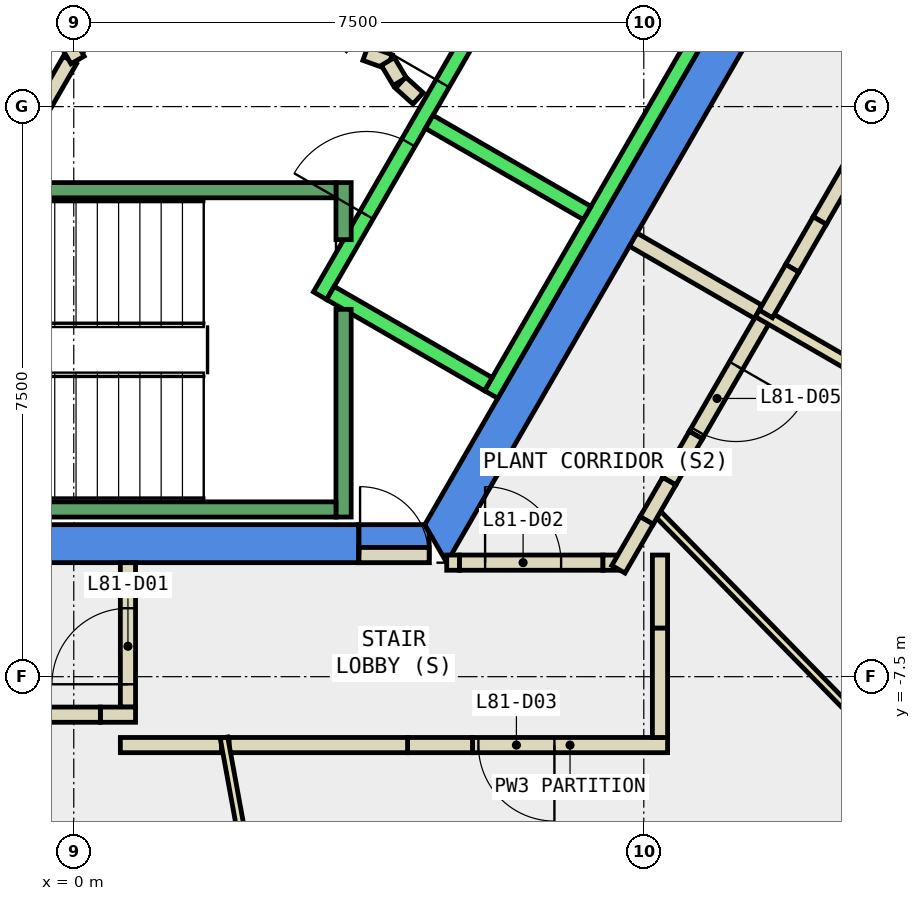
"""IFC4 building model, lengths in metres.
Left out: names, types, materials, properties, quantities, classifications, styles, units other than length and angle.
Written with IfcOpenShell. Run it as: python <this file> out.ifc"""

import sys

from ifc_helpers import new_model, si_unit, direction, frame, frame_2d, origin, place, context, subcontext, project, spatial, polyline, rectangle, outline, extrude, element, fill, save


model = new_model("IFC4")
c1 = context("Model", 3, precision=1e-05, world=origin(), true_north=direction((0.0, 1.0)))
c2 = subcontext(c1, "Body", "Model", "MODEL_VIEW")
j1 = project(units=[si_unit("LENGTHUNIT", "METRE"), si_unit("PLANEANGLEUNIT", "RADIAN")], contexts=[c1])
p1 = place(None, origin())
s1 = spatial("IfcSite", under=j1, at=p1, CompositionType="ELEMENT")
p2 = place(p1, origin())
s2 = spatial("IfcBuilding", under=s1, at=p2, CompositionType="ELEMENT")
p3 = place(p2, frame((0.0, 0.0, 344.9)))
s3 = spatial("IfcBuildingStorey", under=s2, at=p3, CompositionType="ELEMENT", Elevation=344.9)
p4 = place(p3, frame((0.0, 0.0, -0.35)))
e1 = element("IfcWall", 1, at=p4, inside=s3, PredefinedType="SHEAR", context=c2, shape_type="SweptSolid", body=[
    extrude(outline(polyline([(3.75, -6.0), (3.75, -5.5), (-4.619, -5.5), (-4.907, -6.0), (3.75, -6.0)])), origin(), (0.0, 0.0, 1.0), 4.4),
])
p5 = place(p3, frame((0.0, 0.0, 3.6)))
e2 = element("IfcWall", 2, at=p5, inside=s3, PredefinedType="SHEAR", context=c2, shape_type="SweptSolid", body=[
    extrude(outline(polyline([(4.676, -6.0), (4.676, -5.6), (4.619, -5.5), (3.75, -5.5), (3.75, -6.0), (4.676, -6.0)])), origin(), (0.0, 0.0, 1.0), 0.45),
])
p6 = place(p3, frame((0.0, 0.0, -0.35)))
e3 = element("IfcWall", 3, at=p6, inside=s3, PredefinedType="SHEAR", context=c2, shape_type="SweptSolid", body=[
    extrude(outline(polyline([(4.907, -6.0), (9.815, 2.5), (9.238, 2.5), (4.619, -5.5), (4.907, -6.0)])), origin(), (0.0, 0.0, 1.0), 4.4),
])
p7 = place(p3, frame((-0.982, -1.0, 0.0), z_axis=(0.0, 0.0, 1.0), x_axis=(0.50024047865, 0.865886518847, 0.0)))
e4 = element("IfcWall", 4, at=p7, inside=s3, PredefinedType="PARTITIONING", context=c2, shape_type="SweptSolid", body=[
    extrude(rectangle(XDim=1.863, YDim=0.2, at=frame_2d((0.931, 0.0))), origin(), (0.0, 0.0, 1.0), 4.05),
])
p8 = place(p3, frame((3.838, 0.702, 0.0), z_axis=(0.0, 0.0, 1.0), x_axis=(0.941035081519, -0.338308993895, 0.0)))
e5 = element("IfcWall", 5, at=p8, inside=s3, PredefinedType="PARTITIONING", context=c2, shape_type="SweptSolid", body=[
    extrude(rectangle(XDim=0.337, YDim=0.2, at=frame_2d((0.168, 0.0))), origin(), (0.0, 0.0, 1.0), 4.05),
])
p9 = place(p3, frame((4.132, 0.593, 0.0), z_axis=(0.0, 0.0, 1.0), x_axis=(0.513561617048, -0.858052717201, 0.0)))
e6 = element("IfcWall", 6, at=p9, inside=s3, PredefinedType="PARTITIONING", context=c2, shape_type="SweptSolid", body=[
    extrude(rectangle(XDim=0.308, YDim=0.2, at=frame_2d((0.154, 0.0))), origin(), (0.0, 0.0, 1.0), 4.05),
])
p10 = place(p3, frame((4.301, 0.315, 0.0), z_axis=(0.0, 0.0, 1.0), x_axis=(0.741798017506, -0.670623367639, 0.0)))
e7 = element("IfcWall", 7, at=p10, inside=s3, PredefinedType="PARTITIONING", context=c2, shape_type="SweptSolid", body=[
    extrude(rectangle(XDim=0.309, YDim=0.2, at=frame_2d((0.154, 0.0))), origin(), (0.0, 0.0, 1.0), 4.05),
])
p11 = place(p3, frame((-2.54, 5.1, 0.0), z_axis=(0.0, 0.0, 1.0), x_axis=(0.499925051871, -0.866068670783, 0.0)))
e8 = element("IfcWall", 8, at=p11, inside=s3, PredefinedType="PARTITIONING", context=c2, shape_type="SweptSolid", body=[
    extrude(rectangle(XDim=5.181, YDim=0.2, at=frame_2d((2.59, 0.0))), origin(), (0.0, 0.0, 1.0), 4.05),
])
p12 = place(p11, frame((2.04, 0.0, 0.0)))
e9 = element("IfcOpeningElement", 9, at=p12, cuts=e8, PredefinedType="OPENING", context=c2, shape_type="SweptSolid", body=[
    extrude(rectangle(XDim=1.0, YDim=2.1, at=frame_2d((0.5, 1.05))), frame((0.0, 0.11, 0.0), z_axis=(0.0, -1.0, 0.0), x_axis=(1.0, 0.0, 0.0)), (0.0, 0.0, 1.0), 0.22),
])
p13 = place(p3, frame((0.713, -7.9, 0.0), z_axis=(0.0, 0.0, 1.0), x_axis=(0.0, 1.0, 0.0)))
e10 = element("IfcWall", 10, at=p13, inside=s3, PredefinedType="PARTITIONING", context=c2, shape_type="SweptSolid", body=[
    extrude(rectangle(XDim=1.9, YDim=0.2, at=frame_2d((0.95, 0.0))), origin(), (0.0, 0.0, 1.0), 4.05),
])
p14 = place(p13, frame((0.3, 0.0, 0.0)))
e11 = element("IfcOpeningElement", 11, at=p14, cuts=e10, PredefinedType="OPENING", context=c2, shape_type="SweptSolid", body=[
    extrude(rectangle(XDim=1.0, YDim=2.1, at=frame_2d((0.5, 1.05))), frame((0.0, 0.11, 0.0), z_axis=(0.0, -1.0, 0.0), x_axis=(1.0, 0.0, 0.0)), (0.0, 0.0, 1.0), 0.22),
])
p15 = place(p3, frame((4.907, -6.0, 0.0), z_axis=(0.0, 0.0, 1.0), x_axis=(1.0, 0.0, 0.0)))
e12 = element("IfcWall", 12, at=p15, inside=s3, PredefinedType="PARTITIONING", context=c2, shape_type="SweptSolid", body=[
    extrude(rectangle(XDim=0.169, YDim=0.2, at=frame_2d((0.084, 0.0))), origin(), (0.0, 0.0, 1.0), 2.4),
])
p16 = place(p3, frame((7.813, -8.4, 0.0), z_axis=(0.0, 0.0, 1.0), x_axis=(-1.0, 0.0, 0.0)))
e13 = element("IfcWall", 13, at=p16, inside=s3, PredefinedType="PARTITIONING", context=c2, shape_type="SweptSolid", body=[
    extrude(rectangle(XDim=2.567, YDim=0.2, at=frame_2d((1.283, 0.0))), origin(), (0.0, 0.0, 1.0), 4.05),
])
p17 = place(p16, frame((1.489, 0.0, 0.0)))
e14 = element("IfcOpeningElement", 14, at=p17, cuts=e13, PredefinedType="OPENING", context=c2, shape_type="SweptSolid", body=[
    extrude(rectangle(XDim=1.0, YDim=2.1, at=frame_2d((0.5, 1.05))), frame((0.0, 0.11, 0.0), z_axis=(0.0, -1.0, 0.0), x_axis=(1.0, 0.0, 0.0)), (0.0, 0.0, 1.0), 0.22),
])
p18 = place(p3, frame((7.713, -5.9, 0.0), z_axis=(0.0, 0.0, 1.0), x_axis=(0.0, -1.0, 0.0)))
e15 = element("IfcWall", 15, at=p18, inside=s3, PredefinedType="PARTITIONING", context=c2, shape_type="SweptSolid", body=[
    extrude(rectangle(XDim=0.962, YDim=0.2, at=frame_2d((0.481, 0.0))), origin(), (0.0, 0.0, 1.0), 1.95),
])
p19 = place(p3, frame((1.944, -8.4, 0.0), z_axis=(0.0, 0.0, 1.0), x_axis=(-1.0, 0.0, 0.0)))
e16 = element("IfcWall", 16, at=p19, inside=s3, PredefinedType="PARTITIONING", context=c2, shape_type="SweptSolid", body=[
    extrude(rectangle(XDim=1.331, YDim=0.2, at=frame_2d((0.666, 0.0))), origin(), (0.0, 0.0, 1.0), 4.05),
])
p20 = place(p3, frame((0.813, -8.0, 0.0), z_axis=(0.0, 0.0, 1.0), x_axis=(-1.0, 0.0, 0.0)))
e17 = element("IfcWall", 17, at=p20, inside=s3, PredefinedType="PARTITIONING", context=c2, shape_type="SweptSolid", body=[
    extrude(rectangle(XDim=0.463, YDim=0.2, at=frame_2d((0.231, 0.0))), origin(), (0.0, 0.0, 1.0), 4.05),
])
p21 = place(p3, frame((9.106, -2.728, 0.0), z_axis=(0.0, 0.0, 1.0), x_axis=(-0.500246664097, -0.865882945357, 0.0)))
e18 = element("IfcWall", 18, at=p21, inside=s3, PredefinedType="PARTITIONING", context=c2, shape_type="SweptSolid", body=[
    extrude(rectangle(XDim=1.841, YDim=0.2, at=frame_2d((0.92, 0.0))), origin(), (0.0, 0.0, 1.0), 4.05),
])
p22 = place(p21, frame((0.784, 0.0, 0.0)))
e19 = element("IfcOpeningElement", 19, at=p22, cuts=e18, PredefinedType="OPENING", context=c2, shape_type="SweptSolid", body=[
    extrude(rectangle(XDim=1.0, YDim=2.1, at=frame_2d((0.5, 1.05))), frame((0.0, 0.11, 0.0), z_axis=(0.0, -1.0, 0.0), x_axis=(1.0, 0.0, 0.0)), (0.0, 0.0, 1.0), 0.22),
])
p23 = place(p3, frame((7.361, -1.75, 0.0), z_axis=(0.0, 0.0, 1.0), x_axis=(0.865980106173, -0.500078449558, 0.0)))
e20 = element("IfcWall", 20, at=p23, inside=s3, PredefinedType="PARTITIONING", context=c2, shape_type="SweptSolid", body=[
    extrude(rectangle(XDim=1.9, YDim=0.2, at=frame_2d((0.95, 0.0))), origin(), (0.0, 0.0, 1.0), 4.05),
])
p24 = place(p3, frame((7.624, -5.295, 0.0), z_axis=(0.0, 0.0, 1.0), x_axis=(0.699214658751, -0.714911785458, 0.0)))
e21 = element("IfcWall", 21, at=p24, inside=s3, PredefinedType="PARTITIONING", context=c2, shape_type="SweptSolid", body=[
    extrude(rectangle(XDim=10.576, YDim=0.1, at=frame_2d((5.288, 0.0))), origin(), (0.0, 0.0, 1.0), 4.05),
])
p25 = place(p3, frame((3.75, -5.9, 0.0), z_axis=(0.0, 0.0, 1.0), x_axis=(1.0, 0.0, 0.0)))
e22 = element("IfcWall", 22, at=p25, inside=s3, PredefinedType="PARTITIONING", context=c2, shape_type="SweptSolid", body=[
    extrude(rectangle(XDim=0.926, YDim=0.2, at=frame_2d((0.463, 0.0))), origin(), (0.0, 0.0, 1.0), 2.4),
])
p26 = place(p25, frame((0.017, 0.0, 0.0)))
e23 = element("IfcOpeningElement", 23, at=p26, cuts=e22, PredefinedType="OPENING", context=c2, shape_type="SweptSolid", body=[
    extrude(rectangle(XDim=0.9, YDim=2.1, at=frame_2d((0.45, 1.05))), frame((0.0, 0.11, 0.0), z_axis=(0.0, -1.0, 0.0), x_axis=(1.0, 0.0, 0.0)), (0.0, 0.0, 1.0), 0.22),
])
p27 = place(p3, frame((5.076, -6.0, 0.0), z_axis=(0.0, 0.0, 1.0), x_axis=(1.0, 0.0, 0.0)))
e24 = element("IfcWall", 24, at=p27, inside=s3, PredefinedType="PARTITIONING", context=c2, shape_type="SweptSolid", body=[
    extrude(rectangle(XDim=1.887, YDim=0.2, at=frame_2d((0.943, 0.0))), origin(), (0.0, 0.0, 1.0), 4.05),
])
p28 = place(p27, frame((0.336, 0.0, 0.0)))
e25 = element("IfcOpeningElement", 25, at=p28, cuts=e24, PredefinedType="OPENING", context=c2, shape_type="SweptSolid", body=[
    extrude(rectangle(XDim=1.0, YDim=2.1, at=frame_2d((0.5, 1.05))), frame((0.0, 0.11, 0.0), z_axis=(0.0, -1.0, 0.0), x_axis=(1.0, 0.0, 0.0)), (0.0, 0.0, 1.0), 0.22),
])
p29 = place(p3, frame((6.963, -6.0, 0.0), z_axis=(0.0, 0.0, 1.0), x_axis=(1.0, 0.0, 0.0)))
e26 = element("IfcWall", 26, at=p29, inside=s3, PredefinedType="PARTITIONING", context=c2, shape_type="SweptSolid", body=[
    extrude(rectangle(XDim=0.198, YDim=0.2, at=frame_2d((0.099, 0.0))), origin(), (0.0, 0.0, 1.0), 1.95),
])
p30 = place(p3, frame((5.246, -8.4, 0.0), z_axis=(0.0, 0.0, 1.0), x_axis=(-1.0, 0.0, 0.0)))
e27 = element("IfcWall", 27, at=p30, inside=s3, PredefinedType="PARTITIONING", context=c2, shape_type="SweptSolid", body=[
    extrude(rectangle(XDim=0.854, YDim=0.2, at=frame_2d((0.427, 0.0))), origin(), (0.0, 0.0, 1.0), 1.95),
])
p31 = place(p3, frame((4.392, -8.4, 0.0), z_axis=(0.0, 0.0, 1.0), x_axis=(-1.0, 0.0, 0.0)))
e28 = element("IfcWall", 28, at=p31, inside=s3, PredefinedType="PARTITIONING", context=c2, shape_type="SweptSolid", body=[
    extrude(rectangle(XDim=2.348, YDim=0.2, at=frame_2d((1.174, 0.0))), origin(), (0.0, 0.0, 1.0), 4.05),
])
p32 = place(p3, frame((7.713, -6.862, 0.0), z_axis=(0.0, 0.0, 1.0), x_axis=(0.0, -1.0, 0.0)))
e29 = element("IfcWall", 29, at=p32, inside=s3, PredefinedType="PARTITIONING", context=c2, shape_type="SweptSolid", body=[
    extrude(rectangle(XDim=1.438, YDim=0.2, at=frame_2d((0.719, 0.0))), origin(), (0.0, 0.0, 1.0), 4.05),
])
p33 = place(p3, frame((0.35, -8.0, 0.0), z_axis=(0.0, 0.0, 1.0), x_axis=(-1.0, 0.0, 0.0)))
e30 = element("IfcWall", 30, at=p33, inside=s3, PredefinedType="PARTITIONING", context=c2, shape_type="SweptSolid", body=[
    extrude(rectangle(XDim=0.7, YDim=0.2, at=frame_2d((0.35, 0.0))), origin(), (0.0, 0.0, 1.0), 1.95),
])
p34 = place(p3, frame((8.185, -4.322, 0.0), z_axis=(0.0, 0.0, 1.0), x_axis=(-0.500265973451, -0.865871789474, 0.0)))
e31 = element("IfcWall", 31, at=p34, inside=s3, PredefinedType="PARTITIONING", context=c2, shape_type="SweptSolid", body=[
    extrude(rectangle(XDim=0.7, YDim=0.2, at=frame_2d((0.35, 0.0))), origin(), (0.0, 0.0, 1.0), 1.95),
])
p35 = place(p3, frame((7.835, -4.928, 0.0), z_axis=(0.0, 0.0, 1.0), x_axis=(-0.499132035552, -0.866525943689, 0.0)))
e32 = element("IfcWall", 32, at=p35, inside=s3, PredefinedType="PARTITIONING", context=c2, shape_type="SweptSolid", body=[
    extrude(rectangle(XDim=0.597, YDim=0.2, at=frame_2d((0.298, 0.0))), origin(), (0.0, 0.0, 1.0), 4.05),
])
p36 = place(p3, frame((7.537, -5.445, 0.0), z_axis=(0.0, 0.0, 1.0), x_axis=(-0.500529943435, -0.865719224533, 0.0)))
e33 = element("IfcWall", 33, at=p36, inside=s3, PredefinedType="PARTITIONING", context=c2, shape_type="SweptSolid", body=[
    extrude(rectangle(XDim=0.741, YDim=0.2, at=frame_2d((0.371, 0.0))), origin(), (0.0, 0.0, 1.0), 1.95),
])
p37 = place(p3, frame((2.955, -13.655, 0.0), z_axis=(0.0, 0.0, 1.0), x_axis=(-0.179903930573, 0.983684184972, 0.0)))
e34 = element("IfcWall", 34, at=p37, inside=s3, PredefinedType="PARTITIONING", context=c2, shape_type="SweptSolid", body=[
    extrude(rectangle(XDim=5.442, YDim=0.1, at=frame_2d((2.721, 0.0))), origin(), (0.0, 0.0, 1.0), 4.05),
])
p38 = place(p3, frame((18.416, -8.133, 0.0), z_axis=(0.0, 0.0, 1.0), x_axis=(-0.866013839597, 0.500020029225, 0.0)))
e35 = element("IfcWall", 35, at=p38, inside=s3, PredefinedType="PARTITIONING", context=c2, shape_type="SweptSolid", body=[
    extrude(rectangle(XDim=10.866, YDim=0.15, at=frame_2d((5.433, 0.0))), origin(), (0.0, 0.0, 1.0), 4.05),
])
p39 = place(p3, frame((11.003, 0.557, 0.0), z_axis=(0.0, 0.0, 1.0), x_axis=(-0.500318709804, -0.865841318384, 0.0)))
e36 = element("IfcWall", 36, at=p39, inside=s3, PredefinedType="PARTITIONING", context=c2, shape_type="SweptSolid", body=[
    extrude(rectangle(XDim=2.375, YDim=0.2, at=frame_2d((1.187, 0.0))), origin(), (0.0, 0.0, 1.0), 4.05),
])
p40 = place(p3, frame((9.815, -1.499, 0.0), z_axis=(0.0, 0.0, 1.0), x_axis=(-0.499508606083, -0.866308924373, 0.0)))
e37 = element("IfcWall", 37, at=p40, inside=s3, PredefinedType="PARTITIONING", context=c2, shape_type="SweptSolid", body=[
    extrude(rectangle(XDim=0.725, YDim=0.2, at=frame_2d((0.362, 0.0))), origin(), (0.0, 0.0, 1.0), 1.95),
])
p41 = place(p3, frame((9.453, -2.127, 0.0), z_axis=(0.0, 0.0, 1.0), x_axis=(-0.499884866553, -0.866091865907, 0.0)))
e38 = element("IfcWall", 38, at=p41, inside=s3, PredefinedType="PARTITIONING", context=c2, shape_type="SweptSolid", body=[
    extrude(rectangle(XDim=0.694, YDim=0.2, at=frame_2d((0.347, 0.0))), origin(), (0.0, 0.0, 1.0), 4.05),
])
p42 = place(p3, frame((3.24, -2.488, 0.0), z_axis=(0.0, 0.0, 1.0), x_axis=(0.500034260056, 0.866005622828, 0.0)))
e39 = element("IfcWall", 39, at=p42, inside=s3, PredefinedType="STANDARD", context=c2, shape_type="SweptSolid", body=[
    extrude(rectangle(XDim=5.399, YDim=0.2, at=frame_2d((2.7, 0.0))), origin(), (0.0, 0.0, 1.0), 4.05),
])
p43 = place(p42, frame((3.225, 0.0, 0.0)))
e40 = element("IfcOpeningElement", 40, at=p43, cuts=e39, PredefinedType="OPENING", context=c2, shape_type="SweptSolid", body=[
    extrude(rectangle(XDim=1.1, YDim=2.1, at=frame_2d((0.55, 1.05))), frame((0.0, 0.11, 0.0), z_axis=(0.0, -1.0, 0.0), x_axis=(1.0, 0.0, 0.0)), (0.0, 0.0, 1.0), 0.22),
])
p44 = place(p42, frame((1.225, 0.0, 0.0)))
e41 = element("IfcOpeningElement", 41, at=p44, cuts=e39, PredefinedType="OPENING", context=c2, shape_type="SweptSolid", body=[
    extrude(rectangle(XDim=1.1, YDim=2.1, at=frame_2d((0.55, 1.05))), frame((0.0, 0.11, 0.0), z_axis=(0.0, -1.0, 0.0), x_axis=(1.0, 0.0, 0.0)), (0.0, 0.0, 1.0), 0.22),
])
p45 = place(p3, frame((5.492, -3.788, 0.0), z_axis=(0.0, 0.0, 1.0), x_axis=(0.500034260056, 0.866005622828, 0.0)))
e42 = element("IfcWall", 42, at=p45, inside=s3, PredefinedType="STANDARD", context=c2, shape_type="SweptSolid", body=[
    extrude(rectangle(XDim=5.399, YDim=0.2, at=frame_2d((2.7, 0.0))), origin(), (0.0, 0.0, 1.0), 4.05),
])
p46 = place(p3, frame((3.377, -2.452, 0.0), z_axis=(0.0, 0.0, 1.0), x_axis=(0.865955154139, -0.50012165622, 0.0)))
e43 = element("IfcWall", 43, at=p46, inside=s3, PredefinedType="STANDARD", context=c2, shape_type="SweptSolid", body=[
    extrude(rectangle(XDim=2.4, YDim=0.2, at=frame_2d((1.2, 0.0))), origin(), (0.0, 0.0, 1.0), 4.05),
])
p47 = place(p3, frame((4.677, -0.2, 0.0), z_axis=(0.0, 0.0, 1.0), x_axis=(0.865973769406, -0.500089422704, 0.0)))
e44 = element("IfcWall", 44, at=p47, inside=s3, PredefinedType="STANDARD", context=c2, shape_type="SweptSolid", body=[
    extrude(rectangle(XDim=2.399, YDim=0.2, at=frame_2d((1.2, 0.0))), origin(), (0.0, 0.0, 1.0), 4.05),
])
p48 = place(p3, frame((3.55, -2.667, 0.0), z_axis=(0.0, 0.0, 1.0), x_axis=(0.0, -1.0, 0.0)))
e45 = element("IfcWall", 45, at=p48, inside=s3, PredefinedType="STANDARD", context=c2, shape_type="SweptSolid", body=[
    extrude(rectangle(XDim=2.733, YDim=0.2, at=frame_2d((1.366, 0.0))), origin(), (0.0, 0.0, 1.0), 4.05),
])
p49 = place(p3, frame((3.55, -1.0, 0.0), z_axis=(0.0, 0.0, 1.0), x_axis=(0.0, -1.0, 0.0)))
e46 = element("IfcWall", 46, at=p49, inside=s3, PredefinedType="STANDARD", context=c2, shape_type="SweptSolid", body=[
    extrude(rectangle(XDim=0.751, YDim=0.2, at=frame_2d((0.375, 0.0))), origin(), (0.0, 0.0, 1.0), 4.05),
])
p50 = place(p3, frame((-3.45, -1.1, 0.0), z_axis=(0.0, 0.0, 1.0), x_axis=(1.0, 0.0, 0.0)))
e47 = element("IfcWall", 47, at=p50, inside=s3, PredefinedType="STANDARD", context=c2, shape_type="SweptSolid", body=[
    extrude(rectangle(XDim=6.9, YDim=0.2, at=frame_2d((3.45, 0.0))), origin(), (0.0, 0.0, 1.0), 4.05),
])
p51 = place(p50, frame((0.45, 0.0, 0.0)))
e48 = element("IfcOpeningElement", 48, at=p51, cuts=e47, PredefinedType="OPENING", context=c2, shape_type="SweptSolid", body=[
    extrude(rectangle(XDim=1.1, YDim=2.2, at=frame_2d((0.55, 1.1))), frame((0.0, 0.11, 0.0), z_axis=(0.0, -1.0, 0.0), x_axis=(1.0, 0.0, 0.0)), (0.0, 0.0, 1.0), 0.22),
])
p52 = place(p3, frame((-3.45, -5.3, 0.0), z_axis=(0.0, 0.0, 1.0), x_axis=(1.0, 0.0, 0.0)))
e49 = element("IfcWall", 49, at=p52, inside=s3, PredefinedType="STANDARD", context=c2, shape_type="SweptSolid", body=[
    extrude(rectangle(XDim=6.9, YDim=0.2, at=frame_2d((3.45, 0.0))), origin(), (0.0, 0.0, 1.0), 4.05),
])
p53 = place(p14, origin())
e50 = element("IfcDoor", 50, at=p53, inside=s3, OperationType="SINGLE_SWING_LEFT", PredefinedType="DOOR", context=c2, shape_type="SweptSolid", body=[
    extrude(rectangle(XDim=1.0, YDim=2.1, at=frame_2d((0.5, 1.05))), frame((0.0, 0.025, 0.0), z_axis=(0.0, -1.0, 0.0), x_axis=(1.0, 0.0, 0.0)), (0.0, 0.0, 1.0), 0.05),
])
fill(e11, e50)
p54 = place(p28, origin())
e51 = element("IfcDoor", 51, at=p54, inside=s3, OperationType="SINGLE_SWING_RIGHT", PredefinedType="DOOR", context=c2, shape_type="SweptSolid", body=[
    extrude(rectangle(XDim=1.0, YDim=2.1, at=frame_2d((0.5, 1.05))), frame((0.0, 0.025, 0.0), z_axis=(0.0, -1.0, 0.0), x_axis=(1.0, 0.0, 0.0)), (0.0, 0.0, 1.0), 0.05),
])
fill(e25, e51)
p55 = place(p17, origin())
e52 = element("IfcDoor", 52, at=p55, inside=s3, OperationType="SINGLE_SWING_LEFT", PredefinedType="DOOR", context=c2, shape_type="SweptSolid", body=[
    extrude(rectangle(XDim=1.0, YDim=2.1, at=frame_2d((0.5, 1.05))), frame((0.0, 0.025, 0.0), z_axis=(0.0, -1.0, 0.0), x_axis=(1.0, 0.0, 0.0)), (0.0, 0.0, 1.0), 0.05),
])
fill(e14, e52)
p56 = place(p22, origin())
e53 = element("IfcDoor", 53, at=p56, inside=s3, OperationType="SINGLE_SWING_LEFT", PredefinedType="DOOR", context=c2, shape_type="SweptSolid", body=[
    extrude(rectangle(XDim=1.0, YDim=2.1, at=frame_2d((0.5, 1.05))), frame((0.0, 0.025, 0.0), z_axis=(0.0, -1.0, 0.0), x_axis=(1.0, 0.0, 0.0)), (0.0, 0.0, 1.0), 0.05),
])
fill(e19, e53)
p57 = place(p26, origin())
e54 = element("IfcDoor", 54, at=p57, inside=s3, OperationType="SINGLE_SWING_LEFT", PredefinedType="DOOR", context=c2, shape_type="SweptSolid", body=[
    extrude(rectangle(XDim=0.9, YDim=2.1, at=frame_2d((0.45, 1.05))), frame((0.0, 0.025, 0.0), z_axis=(0.0, -1.0, 0.0), x_axis=(1.0, 0.0, 0.0)), (0.0, 0.0, 1.0), 0.05),
])
fill(e23, e54)
p58 = place(p43, origin())
e55 = element("IfcDoor", 55, at=p58, inside=s3, OperationType="SLIDING_TO_LEFT", PredefinedType="DOOR", context=c2, shape_type="SweptSolid", body=[
    extrude(rectangle(XDim=1.1, YDim=2.1, at=frame_2d((0.55, 1.05))), frame((0.0, 0.025, 0.0), z_axis=(0.0, -1.0, 0.0), x_axis=(1.0, 0.0, 0.0)), (0.0, 0.0, 1.0), 0.05),
])
fill(e40, e55)
p59 = place(p44, origin())
e56 = element("IfcDoor", 56, at=p59, inside=s3, OperationType="SLIDING_TO_LEFT", PredefinedType="DOOR", context=c2, shape_type="SweptSolid", body=[
    extrude(rectangle(XDim=1.1, YDim=2.1, at=frame_2d((0.55, 1.05))), frame((0.0, 0.025, 0.0), z_axis=(0.0, -1.0, 0.0), x_axis=(1.0, 0.0, 0.0)), (0.0, 0.0, 1.0), 0.05),
])
fill(e41, e56)
save(model, sys.argv[1])
